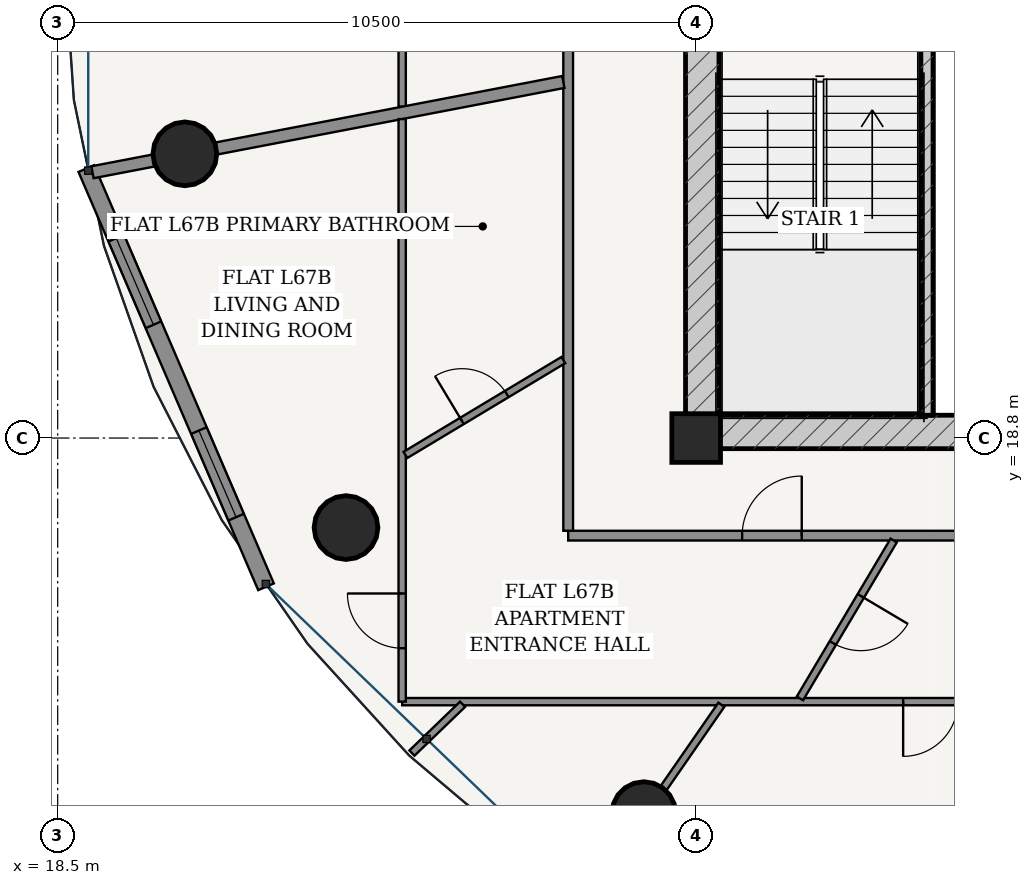
"""IFC4 building model, lengths in metres.
Left out: names, types, materials, properties, quantities, classifications, styles, units other than length and angle.
Written with IfcOpenShell. Run it as: python <this file> out.ifc"""

import sys

from ifc_helpers import new_model, si_unit, direction, frame, frame_2d, origin, origin_2d, place, context, subcontext, project, spatial, rectangle, hollow_circle, extrude, source, transform, mapped, element, fill, save


model = new_model("IFC4")
c1 = context("Model", 3, precision=1e-05, world=origin(), true_north=direction((-0.2419218956, 0.970295726276)))
c2 = subcontext(c1, "Body", "Model", "MODEL_VIEW")
j1 = project(units=[si_unit("LENGTHUNIT", "METRE"), si_unit("PLANEANGLEUNIT", "RADIAN")], contexts=[c1])
p1 = place(None, origin())
s1 = spatial("IfcSite", under=j1, at=p1, CompositionType="ELEMENT")
p2 = place(p1, origin())
s2 = spatial("IfcBuilding", under=s1, at=p2, CompositionType="ELEMENT")
p3 = place(p2, frame((0.0, 0.0, 255.7)))
s3 = spatial("IfcBuildingStorey", under=s2, at=p3, CompositionType="ELEMENT", Elevation=255.7)
p4 = place(p3, frame((29.0, 18.8, 0.0), z_axis=(0.0, 0.0, 1.0), x_axis=(1.0, 0.0, 0.0)))
e1 = element("IfcColumn", 1, at=p4, inside=s3, PredefinedType="COLUMN", context=c2, shape_type="SweptSolid", body=[
    extrude(rectangle(XDim=0.8, YDim=0.8, at=origin_2d()), origin(), (0.0, 0.0, 1.0), 3.75),
])
p5 = place(p3, frame((28.825, 18.9, 0.0), z_axis=(0.0, 0.0, 1.0), x_axis=(1.0, 0.0, 0.0)))
e2 = element("IfcWall", 2, at=p5, inside=s3, PredefinedType="SHEAR", context=c2, shape_type="SweptSolid", body=[
    extrude(rectangle(XDim=18.35, YDim=0.55, at=frame_2d((9.175, 0.0))), origin(), (0.0, 0.0, 1.0), 3.49),
])
p6 = place(p5, frame((7.41, 0.0, 0.0)))
e3 = element("IfcOpeningElement", 3, at=p6, cuts=e2, PredefinedType="OPENING", context=c2, shape_type="SweptSolid", body=[
    extrude(rectangle(XDim=0.85, YDim=2.1, at=frame_2d((0.425, 1.05))), frame((0.0, 0.285, 0.0), z_axis=(0.0, -1.0, 0.0), x_axis=(1.0, 0.0, 0.0)), (0.0, 0.0, 1.0), 0.57),
])
p7 = place(p5, frame((10.49, 0.0, 0.0)))
e4 = element("IfcOpeningElement", 4, at=p7, cuts=e2, PredefinedType="OPENING", context=c2, shape_type="SweptSolid", body=[
    extrude(rectangle(XDim=0.85, YDim=2.1, at=frame_2d((0.425, 1.05))), frame((0.0, 0.285, 0.0), z_axis=(0.0, -1.0, 0.0), x_axis=(1.0, 0.0, 0.0)), (0.0, 0.0, 1.0), 0.57),
])
p8 = place(p3, frame((29.1, 19.175, 0.0), z_axis=(0.0, 0.0, 1.0), x_axis=(0.0, 1.0, 0.0)))
e5 = element("IfcWall", 5, at=p8, inside=s3, PredefinedType="SHEAR", context=c2, shape_type="SweptSolid", body=[
    extrude(rectangle(XDim=15.25, YDim=0.55, at=frame_2d((7.625, 0.0))), origin(), (0.0, 0.0, 1.0), 3.49),
])
p9 = place(p8, frame((9.875, 0.0, 0.0)))
e6 = element("IfcOpeningElement", 6, at=p9, cuts=e5, PredefinedType="OPENING", context=c2, shape_type="SweptSolid", body=[
    extrude(rectangle(XDim=1.5, YDim=2.2, at=frame_2d((0.75, 1.1))), frame((0.0, 0.285, 0.0), z_axis=(0.0, -1.0, 0.0), x_axis=(1.0, 0.0, 0.0)), (0.0, 0.0, 1.0), 0.57),
])
p10 = place(p3, frame((32.795, 19.175, 0.0), z_axis=(0.0, 0.0, 1.0), x_axis=(0.0, 1.0, 0.0)))
e7 = element("IfcWall", 7, at=p10, inside=s3, PredefinedType="SOLIDWALL", context=c2, shape_type="SweptSolid", body=[
    extrude(rectangle(XDim=7.375, YDim=0.2, at=frame_2d((3.688, 0.0))), origin(), (0.0, 0.0, 1.0), 3.49),
])
for number, where, z_axis, x_axis in (
    (8, (20.591, 23.474, 0.0), (0.0, 0.0, 1.0), (1.0, 0.0, 0.0)),
    (9, (23.241, 17.328, 0.0), (0.0, 0.0, 1.0), (1.0, 0.0, 0.0)),
    (10, (28.139, 12.624, 0.0), (0.0, 0.0, 1.0), (1.0, 0.0, 0.0)),
):
    element("IfcColumn", number, at=place(p3, frame(where, z_axis=z_axis, x_axis=x_axis)), inside=s3, PredefinedType="COLUMN", context=c2, shape_type="SweptSolid", body=[
        extrude(hollow_circle(Radius=0.525, WallThickness=0.035, at=origin_2d()), origin(), (0.0, 0.0, 1.0), 3.75),
    ])
p11 = place(p3, frame((18.971, 23.231, 0.0), z_axis=(0.0, 0.0, 1.0), x_axis=(0.394816612978, -0.918759948037, 0.0)))
e11 = element("IfcWall", 11, at=p11, inside=s3, PredefinedType="SOLIDWALL", context=c2, shape_type="SweptSolid", body=[
    extrude(rectangle(XDim=7.485, YDim=0.28, at=frame_2d((3.743, 0.0))), origin(), (0.0, 0.0, 1.0), 3.49),
])
p12 = place(p11, frame((1.246, 0.0, 0.85)))
e12 = element("IfcOpeningElement", 12, at=p12, cuts=e11, PredefinedType="OPENING", context=c2, shape_type="SweptSolid", body=[
    extrude(rectangle(XDim=1.55, YDim=1.95, at=frame_2d((0.775, 0.975))), frame((0.0, 0.15, 0.0), z_axis=(0.0, -1.0, 0.0), x_axis=(1.0, 0.0, 0.0)), (0.0, 0.0, 1.0), 0.3),
])
p13 = place(p11, frame((4.689, 0.0, 0.85)))
e13 = element("IfcOpeningElement", 13, at=p13, cuts=e11, PredefinedType="OPENING", context=c2, shape_type="SweptSolid", body=[
    extrude(rectangle(XDim=1.55, YDim=1.95, at=frame_2d((0.775, 0.975))), frame((0.0, 0.15, 0.0), z_axis=(0.0, -1.0, 0.0), x_axis=(1.0, 0.0, 0.0)), (0.0, 0.0, 1.0), 0.3),
])
p14 = place(p3, frame((26.895, 17.195, 0.0), z_axis=(0.0, 0.0, 1.0), x_axis=(1.0, 0.0, 0.0)))
e14 = element("IfcWall", 14, at=p14, inside=s3, PredefinedType="PARTITIONING", context=c2, shape_type="SweptSolid", body=[
    extrude(rectangle(XDim=22.21, YDim=0.16, at=frame_2d((11.105, 0.0))), origin(), (0.0, 0.0, 1.0), 3.015),
])
p15 = place(p14, frame((2.861, 0.0, 0.0)))
e15 = element("IfcOpeningElement", 15, at=p15, cuts=e14, PredefinedType="OPENING", context=c2, shape_type="SweptSolid", body=[
    extrude(rectangle(XDim=0.98, YDim=2.2, at=frame_2d((0.49, 1.1))), frame((0.0, 0.09, 0.0), z_axis=(0.0, -1.0, 0.0), x_axis=(1.0, 0.0, 0.0)), (0.0, 0.0, 1.0), 0.18),
])
p16 = place(p14, frame((16.97, 0.0, 0.0)))
e16 = element("IfcOpeningElement", 16, at=p16, cuts=e14, PredefinedType="OPENING", context=c2, shape_type="SweptSolid", body=[
    extrude(rectangle(XDim=0.98, YDim=2.2, at=frame_2d((0.49, 1.1))), frame((0.0, 0.09, 0.0), z_axis=(0.0, -1.0, 0.0), x_axis=(1.0, 0.0, 0.0)), (0.0, 0.0, 1.0), 0.18),
])
p17 = place(p3, frame((26.895, 17.275, 0.0), z_axis=(0.0, 0.0, 1.0), x_axis=(0.0, 1.0, 0.0)))
e17 = element("IfcWall", 17, at=p17, inside=s3, PredefinedType="PARTITIONING", context=c2, shape_type="SweptSolid", body=[
    extrude(rectangle(XDim=13.925, YDim=0.16, at=frame_2d((6.962, 0.0))), origin(), (0.0, 0.0, 1.0), 3.015),
])
p18 = place(p3, frame((24.165, 24.249, 0.0), z_axis=(0.0, 0.0, 1.0), x_axis=(0.0, 1.0, 0.0)))
e18 = element("IfcWall", 18, at=p18, inside=s3, PredefinedType="PARTITIONING", context=c2, shape_type="SweptSolid", body=[
    extrude(rectangle(XDim=9.761, YDim=0.12, at=frame_2d((4.88, 0.0))), origin(), (0.0, 0.0, 1.0), 3.015),
])
p19 = place(p18, frame((4.43, 0.0, 0.0)))
e19 = element("IfcOpeningElement", 19, at=p19, cuts=e18, PredefinedType="OPENING", context=c2, shape_type="SweptSolid", body=[
    extrude(rectangle(XDim=0.9, YDim=2.15, at=frame_2d((0.45, 1.075))), frame((0.0, 0.07, 0.0), z_axis=(0.0, -1.0, 0.0), x_axis=(1.0, 0.0, 0.0)), (0.0, 0.0, 1.0), 0.14),
])
p20 = place(p3, frame((26.815, 24.656, 0.0), z_axis=(0.0, 0.0, 1.0), x_axis=(-0.982109889803, -0.188308694305, 0.0)))
e20 = element("IfcWall", 20, at=p20, inside=s3, PredefinedType="PARTITIONING", context=c2, shape_type="SweptSolid", body=[
    extrude(rectangle(XDim=7.884, YDim=0.2, at=frame_2d((3.942, 0.0))), origin(), (0.0, 0.0, 1.0), 3.015),
])
p21 = place(p3, frame((35.353, 14.465, 0.0), z_axis=(0.0, 0.0, 1.0), x_axis=(-1.0, 0.0, 0.0)))
e21 = element("IfcWall", 21, at=p21, inside=s3, PredefinedType="PARTITIONING", context=c2, shape_type="SweptSolid", body=[
    extrude(rectangle(XDim=11.188, YDim=0.12, at=frame_2d((5.594, 0.0))), origin(), (0.0, 0.0, 1.0), 3.015),
])
p22 = place(p21, frame((2.049, 0.0, 0.0)))
e22 = element("IfcOpeningElement", 22, at=p22, cuts=e21, PredefinedType="OPENING", context=c2, shape_type="SweptSolid", body=[
    extrude(rectangle(XDim=0.9, YDim=2.15, at=frame_2d((0.45, 1.075))), frame((0.0, 0.07, 0.0), z_axis=(0.0, -1.0, 0.0), x_axis=(1.0, 0.0, 0.0)), (0.0, 0.0, 1.0), 0.14),
])
p23 = place(p3, frame((24.165, 14.465, 0.0), z_axis=(0.0, 0.0, 1.0), x_axis=(0.0, 1.0, 0.0)))
e23 = element("IfcWall", 23, at=p23, inside=s3, PredefinedType="PARTITIONING", context=c2, shape_type="SweptSolid", body=[
    extrude(rectangle(XDim=9.58, YDim=0.12, at=frame_2d((4.79, 0.0))), origin(), (0.0, 0.0, 1.0), 3.015),
])
p24 = place(p23, frame((0.879, 0.0, 0.0)))
e24 = element("IfcOpeningElement", 24, at=p24, cuts=e23, PredefinedType="OPENING", context=c2, shape_type="SweptSolid", body=[
    extrude(rectangle(XDim=0.9, YDim=2.15, at=frame_2d((0.45, 1.075))), frame((0.0, 0.07, 0.0), z_axis=(0.0, -1.0, 0.0), x_axis=(1.0, 0.0, 0.0)), (0.0, 0.0, 1.0), 0.14),
])
p25 = place(p3, frame((25.159, 14.422, 0.0), z_axis=(0.0, 0.0, 1.0), x_axis=(-0.720070222664, -0.693901199331, 0.0)))
e25 = element("IfcWall", 25, at=p25, inside=s3, PredefinedType="PARTITIONING", context=c2, shape_type="SweptSolid", body=[
    extrude(rectangle(XDim=1.157, YDim=0.12, at=frame_2d((0.578, 0.0))), origin(), (0.0, 0.0, 1.0), 3.49),
])
p26 = place(p3, frame((29.414, 14.414, 0.0), z_axis=(0.0, 0.0, 1.0), x_axis=(-0.569657021681, -0.821882520589, 0.0)))
e26 = element("IfcWall", 26, at=p26, inside=s3, PredefinedType="PARTITIONING", context=c2, shape_type="SweptSolid", body=[
    extrude(rectangle(XDim=3.748, YDim=0.12, at=frame_2d((1.874, 0.0))), origin(), (0.0, 0.0, 1.0), 3.015),
])
p27 = place(p3, frame((26.815, 20.082, 0.0), z_axis=(0.0, 0.0, 1.0), x_axis=(-0.857265264382, -0.514875000834, 0.0)))
e27 = element("IfcWall", 27, at=p27, inside=s3, PredefinedType="PARTITIONING", context=c2, shape_type="SweptSolid", body=[
    extrude(rectangle(XDim=3.029, YDim=0.12, at=frame_2d((1.515, 0.0))), origin(), (0.0, 0.0, 1.0), 3.209),
])
p28 = place(p27, frame((1.085, 0.0, 0.0)))
e28 = element("IfcOpeningElement", 28, at=p28, cuts=e27, PredefinedType="OPENING", context=c2, shape_type="SweptSolid", body=[
    extrude(rectangle(XDim=0.86, YDim=2.15, at=frame_2d((0.43, 1.075))), frame((0.0, 0.07, 0.0), z_axis=(0.0, -1.0, 0.0), x_axis=(1.0, 0.0, 0.0)), (0.0, 0.0, 1.0), 0.14),
])
p29 = place(p3, frame((32.248, 17.115, 0.0), z_axis=(0.0, 0.0, 1.0), x_axis=(-0.510591051721, -0.85982369001, 0.0)))
e29 = element("IfcWall", 29, at=p29, inside=s3, PredefinedType="PARTITIONING", context=c2, shape_type="SweptSolid", body=[
    extrude(rectangle(XDim=3.02, YDim=0.12, at=frame_2d((1.51, 0.0))), origin(), (0.0, 0.0, 1.0), 3.209),
])
p30 = place(p29, frame((1.06, 0.0, 0.0)))
e30 = element("IfcOpeningElement", 30, at=p30, cuts=e29, PredefinedType="OPENING", context=c2, shape_type="SweptSolid", body=[
    extrude(rectangle(XDim=0.9, YDim=2.15, at=frame_2d((0.45, 1.075))), frame((0.0, 0.07, 0.0), z_axis=(0.0, -1.0, 0.0), x_axis=(1.0, 0.0, 0.0)), (0.0, 0.0, 1.0), 0.14),
])
m1 = source(origin(), c2, "Body", "SweptSolid", [
    extrude(rectangle(XDim=1.55, YDim=1.95, at=frame_2d((0.775, 0.975))), frame((0.0, 0.03, 0.0), z_axis=(0.0, -1.0, 0.0), x_axis=(1.0, 0.0, 0.0)), (0.0, 0.0, 1.0), 0.06),
])
p31 = place(p12, origin())
e31 = element("IfcWindow", 31, at=p31, inside=s3, PartitioningType="SINGLE_PANEL", PredefinedType="WINDOW", context=c2, shape_type="MappedRepresentation", body=[
    mapped(m1, transform((0.0, 0.0, 0.0), scale=1.0)),
])
fill(e12, e31)
p32 = place(p13, origin())
e32 = element("IfcWindow", 32, at=p32, inside=s3, PartitioningType="SINGLE_PANEL", PredefinedType="WINDOW", context=c2, shape_type="MappedRepresentation", body=[
    mapped(m1, transform((0.0, 0.0, 0.0), scale=1.0)),
])
fill(e13, e32)
m2 = source(origin(), c2, "Body", "SweptSolid", [
    extrude(rectangle(XDim=0.98, YDim=2.2, at=frame_2d((0.49, 1.1))), frame((0.0, 0.025, 0.0), z_axis=(0.0, -1.0, 0.0), x_axis=(1.0, 0.0, 0.0)), (0.0, 0.0, 1.0), 0.05),
])
p33 = place(p15, origin())
e33 = element("IfcDoor", 33, at=p33, inside=s3, OperationType="SINGLE_SWING_RIGHT", PredefinedType="DOOR", context=c2, shape_type="MappedRepresentation", body=[
    mapped(m2, transform((0.0, 0.0, 0.0), scale=1.0)),
])
fill(e15, e33)
m3 = source(origin(), c2, "Body", "SweptSolid", [
    extrude(rectangle(XDim=0.86, YDim=2.15, at=frame_2d((0.43, 1.075))), frame((0.0, 0.025, 0.0), z_axis=(0.0, -1.0, 0.0), x_axis=(1.0, 0.0, 0.0)), (0.0, 0.0, 1.0), 0.05),
])
p34 = place(p28, frame((0.86, 0.0, 0.0), z_axis=(0.0, 0.0, 1.0), x_axis=(-1.0, 0.0, 0.0)))
e34 = element("IfcDoor", 34, at=p34, inside=s3, OperationType="SINGLE_SWING_LEFT", PredefinedType="DOOR", context=c2, shape_type="MappedRepresentation", body=[
    mapped(m3, transform((0.0, 0.0, 0.0), scale=1.0)),
])
fill(e28, e34)
m4 = source(origin(), c2, "Body", "SweptSolid", [
    extrude(rectangle(XDim=0.9, YDim=2.15, at=frame_2d((0.45, 1.075))), frame((0.0, 0.025, 0.0), z_axis=(0.0, -1.0, 0.0), x_axis=(1.0, 0.0, 0.0)), (0.0, 0.0, 1.0), 0.05),
])
p35 = place(p24, origin())
e35 = element("IfcDoor", 35, at=p35, inside=s3, OperationType="SINGLE_SWING_RIGHT", PredefinedType="DOOR", context=c2, shape_type="MappedRepresentation", body=[
    mapped(m4, transform((0.0, 0.0, 0.0), scale=1.0)),
])
fill(e24, e35)
p36 = place(p30, origin())
e36 = element("IfcDoor", 36, at=p36, inside=s3, OperationType="SINGLE_SWING_LEFT", PredefinedType="DOOR", context=c2, shape_type="MappedRepresentation", body=[
    mapped(m4, transform((0.0, 0.0, 0.0), scale=1.0)),
])
fill(e30, e36)
p37 = place(p22, origin())
e37 = element("IfcDoor", 37, at=p37, inside=s3, OperationType="SINGLE_SWING_RIGHT", PredefinedType="DOOR", context=c2, shape_type="MappedRepresentation", body=[
    mapped(m4, transform((0.0, 0.0, 0.0), scale=1.0)),
])
fill(e22, e37)
save(model, sys.argv[1])
